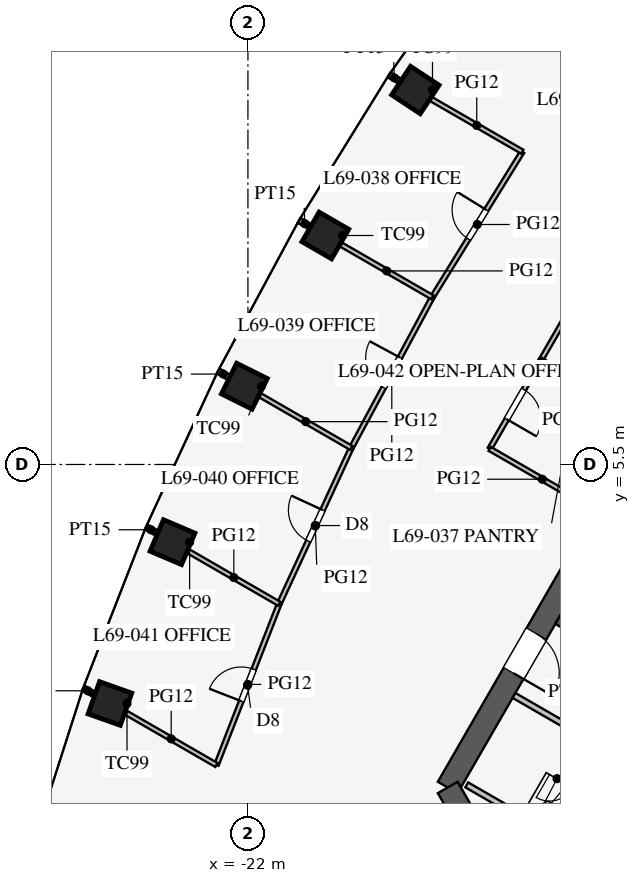
"""IFC4 building model, lengths in metres.
Left out: names, types, materials, properties, quantities, classifications, styles, units other than length and angle.
Written with IfcOpenShell. Run it as: python <this file> out.ifc"""

import sys

from ifc_helpers import new_model, si_unit, direction, frame, frame_2d, origin, origin_2d, place, context, subcontext, project, spatial, rectangle, extrude, element, fill, save


model = new_model("IFC4")
c1 = context("Model", 3, precision=1e-05, world=origin(), true_north=direction((0.0, 1.0)))
c2 = subcontext(c1, "Body", "Model", "MODEL_VIEW")
j1 = project(units=[si_unit("LENGTHUNIT", "METRE"), si_unit("PLANEANGLEUNIT", "RADIAN")], contexts=[c1])
p1 = place(None, origin())
s1 = spatial("IfcSite", under=j1, at=p1, CompositionType="ELEMENT")
p2 = place(p1, origin())
s2 = spatial("IfcBuilding", under=s1, at=p2, CompositionType="ELEMENT")
p3 = place(p2, frame((0.0, 0.0, 301.5)))
s3 = spatial("IfcBuildingStorey", under=s2, at=p3, CompositionType="ELEMENT", Elevation=301.5)
for number, where, z_axis, x_axis in (
    (1, (-17.594, 15.354, 0.0), (0.0, 0.0, 1.0), (-0.552, -0.834, 0.0)),
    (2, (-19.963, 11.526, 0.0), (0.0, 0.0, 1.0), (-0.5, -0.866, 0.0)),
    (3, (-22.094, 7.56, 0.0), (0.0, 0.0, 1.0), (-0.447, -0.895, 0.0)),
    (4, (-23.985, 3.455, 0.0), (0.0, 0.0, 1.0), (-0.391, -0.92, 0.0)),
    (5, (-25.632, -0.79, 0.0), (0.0, 0.0, 1.0), (-0.334, -0.942, 0.0)),
):
    element("IfcColumn", number, at=place(p3, frame(where, z_axis=z_axis, x_axis=x_axis)), inside=s3, PredefinedType="COLUMN", context=c2, shape_type="SweptSolid", body=[
        extrude(rectangle(XDim=0.9, YDim=0.9, at=origin_2d()), origin(), (0.0, 0.0, 1.0), 4.2),
    ])
p4 = place(p3, frame((-5.773, 16.0, 0.0), z_axis=(0.0, 0.0, 1.0), x_axis=(-0.500002442456, -0.866023993627, 0.0)))
e6 = element("IfcWall", 6, at=p4, inside=s3, PredefinedType="SHEAR", context=c2, shape_type="SweptSolid", body=[
    extrude(rectangle(XDim=21.939, YDim=0.6, at=frame_2d((10.97, 0.0))), origin(), (0.0, 0.0, 1.0), 4.2),
])
p5 = place(p4, frame((17.27, 0.0, 0.0)))
e7 = element("IfcOpeningElement", 7, at=p5, cuts=e6, PredefinedType="OPENING", context=c2, shape_type="SweptSolid", body=[
    extrude(rectangle(XDim=1.2, YDim=2.1, at=frame_2d((0.6, 1.05))), frame((0.0, 0.31, 0.0), z_axis=(0.0, -1.0, 0.0), x_axis=(1.0, 0.0, 0.0)), (0.0, 0.0, 1.0), 0.62),
])
p6 = place(p4, frame((3.47, 0.0, 0.0)))
e8 = element("IfcOpeningElement", 8, at=p6, cuts=e6, PredefinedType="OPENING", context=c2, shape_type="SweptSolid", body=[
    extrude(rectangle(XDim=1.2, YDim=2.1, at=frame_2d((0.6, 1.05))), frame((0.0, 0.31, 0.0), z_axis=(0.0, -1.0, 0.0), x_axis=(1.0, 0.0, 0.0)), (0.0, 0.0, 1.0), 0.62),
])
p7 = place(p3, frame((-16.743, -3.0, 0.0), z_axis=(0.0, 0.0, 1.0), x_axis=(0.499995765644, -0.866027848477, 0.0)))
e9 = element("IfcWall", 9, at=p7, inside=s3, PredefinedType="SHEAR", context=c2, shape_type="SweptSolid", body=[
    extrude(rectangle(XDim=11.547, YDim=0.6, at=frame_2d((5.773, 0.0))), origin(), (0.0, 0.0, 1.0), 4.2),
])
p8 = place(p3, frame((-11.532, 0.076, 0.0), z_axis=(0.0, 0.0, 1.0), x_axis=(-0.86604424267, 0.499967368674, 0.0)))
e10 = element("IfcWall", 10, at=p8, inside=s3, PredefinedType="SHEAR", context=c2, shape_type="SweptSolid", body=[
    extrude(rectangle(XDim=2.675, YDim=0.25, at=frame_2d((1.337, 0.0))), origin(), (0.0, 0.0, 1.0), 4.2),
])
p9 = place(p3, frame((-6.663, -1.509, 0.0), z_axis=(0.0, 0.0, 1.0), x_axis=(-0.86603049496, -0.499991181721, 0.0)))
e11 = element("IfcWall", 11, at=p9, inside=s3, PredefinedType="SHEAR", context=c2, shape_type="SweptSolid", body=[
    extrude(rectangle(XDim=9.175, YDim=0.6, at=frame_2d((4.587, 0.0))), origin(), (0.0, 0.0, 1.0), 4.2),
])
p10 = place(p3, frame((-10.495, -3.178, 0.0), z_axis=(0.0, 0.0, 1.0), x_axis=(-0.866021400173, 0.500006934395, 0.0)))
e12 = element("IfcWall", 12, at=p10, inside=s3, PredefinedType="PARTITIONING", context=c2, shape_type="SweptSolid", body=[
    extrude(rectangle(XDim=5.2, YDim=0.15, at=frame_2d((2.6, 0.0))), origin(), (0.0, 0.0, 1.0), 4.0),
])
p11 = place(p10, frame((1.3, 0.0, 0.0)))
e13 = element("IfcOpeningElement", 13, at=p11, cuts=e12, PredefinedType="OPENING", context=c2, shape_type="SweptSolid", body=[
    extrude(rectangle(XDim=0.9, YDim=2.1, at=frame_2d((0.45, 1.05))), frame((0.0, 0.085, 0.0), z_axis=(0.0, -1.0, 0.0), x_axis=(1.0, 0.0, 0.0)), (0.0, 0.0, 1.0), 0.17),
])
p12 = place(p3, frame((-12.691, -4.982, 0.0), z_axis=(0.0, 0.0, 1.0), x_axis=(-0.8660249478, 0.500000789788, 0.0)))
e14 = element("IfcWall", 14, at=p12, inside=s3, PredefinedType="PARTITIONING", context=c2, shape_type="SweptSolid", body=[
    extrude(rectangle(XDim=4.1, YDim=0.15, at=frame_2d((2.05, 0.0))), origin(), (0.0, 0.0, 1.0), 4.0),
])
p13 = place(p3, frame((-14.289, 8.25, 0.0), z_axis=(0.0, 0.0, 1.0), x_axis=(-0.50000943426, -0.866019956843, 0.0)))
e15 = element("IfcWall", 15, at=p13, inside=s3, PredefinedType="PARTITIONING", context=c2, shape_type="SweptSolid", body=[
    extrude(rectangle(XDim=2.7, YDim=0.12, at=frame_2d((1.35, 0.0))), origin(), (0.0, 0.0, 1.0), 2.9),
])
p14 = place(p13, frame((0.9, 0.0, 0.15)))
e16 = element("IfcOpeningElement", 16, at=p14, cuts=e15, PredefinedType="OPENING", context=c2, shape_type="SweptSolid", body=[
    extrude(rectangle(XDim=0.9, YDim=2.1, at=frame_2d((0.45, 1.05))), frame((0.0, 0.07, 0.0), z_axis=(0.0, -1.0, 0.0), x_axis=(1.0, 0.0, 0.0)), (0.0, 0.0, 1.0), 0.14),
])
p15 = place(p3, frame((-11.49, 13.1, 0.0), z_axis=(0.0, 0.0, 1.0), x_axis=(-0.499965239061, -0.866045472092, 0.0)))
e17 = element("IfcWall", 17, at=p15, inside=s3, PredefinedType="PARTITIONING", context=c2, shape_type="SweptSolid", body=[
    extrude(rectangle(XDim=5.6, YDim=0.12, at=frame_2d((2.8, 0.0))), origin(), (0.0, 0.0, 1.0), 2.9),
])
p16 = place(p15, frame((2.3, 0.0, 0.15)))
e18 = element("IfcOpeningElement", 18, at=p16, cuts=e17, PredefinedType="OPENING", context=c2, shape_type="SweptSolid", body=[
    extrude(rectangle(XDim=1.0, YDim=2.1, at=frame_2d((0.5, 1.05))), frame((0.0, 0.07, 0.0), z_axis=(0.0, -1.0, 0.0), x_axis=(1.0, 0.0, 0.0)), (0.0, 0.0, 1.0), 0.14),
])
for number, where, z_axis, x_axis in (
    (19, (-12.868, 4.312, 0.0), (0.0, 0.0, 1.0), (-0.866, 0.5, 0.0)),
    (20, (-11.518, 6.65, 0.0), (0.0, 0.0, 1.0), (-0.866, 0.5, 0.0)),
):
    element("IfcWall", number, at=place(p3, frame(where, z_axis=z_axis, x_axis=x_axis)), inside=s3, PredefinedType="PARTITIONING", context=c2, shape_type="SweptSolid", body=[
        extrude(rectangle(XDim=3.2, YDim=0.12, at=frame_2d((1.6, 0.0))), origin(), (0.0, 0.0, 1.0), 2.9),
    ])
p17 = place(p3, frame((-20.356, 11.753, 0.0), z_axis=(0.0, 0.0, 1.0), x_axis=(-0.865899514186, 0.500217983815, 0.0)))
e21 = element("IfcWall", 21, at=p17, inside=s3, PredefinedType="PARTITIONING", context=c2, shape_type="SweptSolid", body=[
    extrude(rectangle(XDim=0.341, YDim=0.15, at=frame_2d((0.17, 0.0))), origin(), (0.0, 0.0, 1.0), 2.9),
])
p18 = place(p3, frame((-26.089, -0.526, 0.0), z_axis=(0.0, 0.0, 1.0), x_axis=(-0.865982457891, 0.500074377092, 0.0)))
e22 = element("IfcWall", 22, at=p18, inside=s3, PredefinedType="PARTITIONING", context=c2, shape_type="SweptSolid", body=[
    extrude(rectangle(XDim=0.28, YDim=0.15, at=frame_2d((0.14, 0.0))), origin(), (0.0, 0.0, 1.0), 2.9),
])
p19 = place(p3, frame((-22.51, 7.8, 0.0), z_axis=(0.0, 0.0, 1.0), x_axis=(-0.866095534226, 0.499878510834, 0.0)))
e23 = element("IfcWall", 23, at=p19, inside=s3, PredefinedType="PARTITIONING", context=c2, shape_type="SweptSolid", body=[
    extrude(rectangle(XDim=0.316, YDim=0.15, at=frame_2d((0.158, 0.0))), origin(), (0.0, 0.0, 1.0), 2.9),
])
p20 = place(p3, frame((-24.422, 3.708, 0.0), z_axis=(0.0, 0.0, 1.0), x_axis=(-0.866254317358, 0.499603300288, 0.0)))
e24 = element("IfcWall", 24, at=p20, inside=s3, PredefinedType="PARTITIONING", context=c2, shape_type="SweptSolid", body=[
    extrude(rectangle(XDim=0.296, YDim=0.15, at=frame_2d((0.148, 0.0))), origin(), (0.0, 0.0, 1.0), 2.9),
])
p21 = place(p3, frame((-18.01, 15.594, 0.0), z_axis=(0.0, 0.0, 1.0), x_axis=(-0.866095534226, 0.499878510834, 0.0)))
e25 = element("IfcWall", 25, at=p21, inside=s3, PredefinedType="PARTITIONING", context=c2, shape_type="SweptSolid", body=[
    extrude(rectangle(XDim=0.316, YDim=0.15, at=frame_2d((0.158, 0.0))), origin(), (0.0, 0.0, 1.0), 2.9),
])
p22 = place(p3, frame((-17.149, 9.901, 0.0), z_axis=(0.0, 0.0, 1.0), x_axis=(-0.473566170147, -0.880758242932, 0.0)))
e26 = element("IfcWall", 26, at=p22, inside=s3, PredefinedType="PARTITIONING", context=c2, shape_type="SweptSolid", body=[
    extrude(rectangle(XDim=4.502, YDim=0.12, at=frame_2d((2.251, 0.0))), origin(), (0.0, 0.0, 1.0), 2.9),
])
p23 = place(p22, frame((1.8, 0.0, 0.15)))
e27 = element("IfcOpeningElement", 27, at=p23, cuts=e26, PredefinedType="OPENING", context=c2, shape_type="SweptSolid", body=[
    extrude(rectangle(XDim=0.9, YDim=2.1, at=frame_2d((0.45, 1.05))), frame((0.0, 0.07, 0.0), z_axis=(0.0, -1.0, 0.0), x_axis=(1.0, 0.0, 0.0)), (0.0, 0.0, 1.0), 0.14),
])
p24 = place(p3, frame((-19.281, 5.936, 0.0), z_axis=(0.0, 0.0, 1.0), x_axis=(-0.419270595022, -0.907861315483, 0.0)))
e28 = element("IfcWall", 28, at=p24, inside=s3, PredefinedType="PARTITIONING", context=c2, shape_type="SweptSolid", body=[
    extrude(rectangle(XDim=4.519, YDim=0.12, at=frame_2d((2.259, 0.0))), origin(), (0.0, 0.0, 1.0), 2.9),
])
p25 = place(p24, frame((1.8, 0.0, 0.15)))
e29 = element("IfcOpeningElement", 29, at=p25, cuts=e28, PredefinedType="OPENING", context=c2, shape_type="SweptSolid", body=[
    extrude(rectangle(XDim=0.9, YDim=2.1, at=frame_2d((0.45, 1.05))), frame((0.0, 0.07, 0.0), z_axis=(0.0, -1.0, 0.0), x_axis=(1.0, 0.0, 0.0)), (0.0, 0.0, 1.0), 0.14),
])
p26 = place(p3, frame((-21.175, 1.833, 0.0), z_axis=(0.0, 0.0, 1.0), x_axis=(-0.363230297573, -0.931699388711, 0.0)))
e30 = element("IfcWall", 30, at=p26, inside=s3, PredefinedType="PARTITIONING", context=c2, shape_type="SweptSolid", body=[
    extrude(rectangle(XDim=4.552, YDim=0.12, at=frame_2d((2.276, 0.0))), origin(), (0.0, 0.0, 1.0), 2.9),
])
p27 = place(p26, frame((1.85, 0.0, 0.15)))
e31 = element("IfcOpeningElement", 31, at=p27, cuts=e30, PredefinedType="OPENING", context=c2, shape_type="SweptSolid", body=[
    extrude(rectangle(XDim=0.9, YDim=2.1, at=frame_2d((0.45, 1.05))), frame((0.0, 0.07, 0.0), z_axis=(0.0, -1.0, 0.0), x_axis=(1.0, 0.0, 0.0)), (0.0, 0.0, 1.0), 0.14),
])
p28 = place(p3, frame((-14.781, 13.73, 0.0), z_axis=(0.0, 0.0, 1.0), x_axis=(-0.525981173851, -0.850496210899, 0.0)))
e32 = element("IfcWall", 32, at=p28, inside=s3, PredefinedType="PARTITIONING", context=c2, shape_type="SweptSolid", body=[
    extrude(rectangle(XDim=4.502, YDim=0.12, at=frame_2d((2.251, 0.0))), origin(), (0.0, 0.0, 1.0), 2.9),
])
p29 = place(p28, frame((1.8, 0.0, 0.15)))
e33 = element("IfcOpeningElement", 33, at=p29, cuts=e32, PredefinedType="OPENING", context=c2, shape_type="SweptSolid", body=[
    extrude(rectangle(XDim=0.9, YDim=2.1, at=frame_2d((0.45, 1.05))), frame((0.0, 0.07, 0.0), z_axis=(0.0, -1.0, 0.0), x_axis=(1.0, 0.0, 0.0)), (0.0, 0.0, 1.0), 0.14),
])
p30 = place(p3, frame((-17.149, 9.901, 0.0), z_axis=(0.0, 0.0, 1.0), x_axis=(-0.866027073272, 0.499997108352, 0.0)))
e34 = element("IfcWall", 34, at=p30, inside=s3, PredefinedType="PARTITIONING", context=c2, shape_type="SweptSolid", body=[
    extrude(rectangle(XDim=2.77, YDim=0.12, at=frame_2d((1.385, 0.0))), origin(), (0.0, 0.0, 1.0), 2.9),
])
p31 = place(p3, frame((-22.829, -2.408, 0.0), z_axis=(0.0, 0.0, 1.0), x_axis=(-0.866031754707, 0.499988999718, 0.0)))
e35 = element("IfcWall", 35, at=p31, inside=s3, PredefinedType="PARTITIONING", context=c2, shape_type="SweptSolid", body=[
    extrude(rectangle(XDim=2.749, YDim=0.12, at=frame_2d((1.374, 0.0))), origin(), (0.0, 0.0, 1.0), 2.9),
])
p32 = place(p3, frame((-19.281, 5.936, 0.0), z_axis=(0.0, 0.0, 1.0), x_axis=(-0.866019581949, 0.500010083578, 0.0)))
e36 = element("IfcWall", 36, at=p32, inside=s3, PredefinedType="PARTITIONING", context=c2, shape_type="SweptSolid", body=[
    extrude(rectangle(XDim=2.768, YDim=0.12, at=frame_2d((1.384, 0.0))), origin(), (0.0, 0.0, 1.0), 2.9),
])
p33 = place(p3, frame((-21.175, 1.833, 0.0), z_axis=(0.0, 0.0, 1.0), x_axis=(-0.86602506628, 0.500000584575, 0.0)))
e37 = element("IfcWall", 37, at=p33, inside=s3, PredefinedType="PARTITIONING", context=c2, shape_type="SweptSolid", body=[
    extrude(rectangle(XDim=2.761, YDim=0.12, at=frame_2d((1.38, 0.0))), origin(), (0.0, 0.0, 1.0), 2.9),
])
p34 = place(p3, frame((-14.781, 13.73, 0.0), z_axis=(0.0, 0.0, 1.0), x_axis=(-0.866019581949, 0.500010083578, 0.0)))
e38 = element("IfcWall", 38, at=p34, inside=s3, PredefinedType="PARTITIONING", context=c2, shape_type="SweptSolid", body=[
    extrude(rectangle(XDim=2.768, YDim=0.12, at=frame_2d((1.384, 0.0))), origin(), (0.0, 0.0, 1.0), 2.9),
])
p35 = place(p5, origin())
e39 = element("IfcDoor", 39, at=p35, inside=s3, OperationType="SINGLE_SWING_RIGHT", PredefinedType="DOOR", context=c2, shape_type="SweptSolid", body=[
    extrude(rectangle(XDim=1.2, YDim=2.1, at=frame_2d((0.6, 1.05))), frame((0.0, 0.025, 0.0), z_axis=(0.0, -1.0, 0.0), x_axis=(1.0, 0.0, 0.0)), (0.0, 0.0, 1.0), 0.05),
])
fill(e7, e39)
p36 = place(p14, origin())
e40 = element("IfcDoor", 40, at=p36, inside=s3, OperationType="SINGLE_SWING_RIGHT", PredefinedType="DOOR", context=c2, shape_type="SweptSolid", body=[
    extrude(rectangle(XDim=0.9, YDim=2.1, at=frame_2d((0.45, 1.05))), frame((0.0, 0.025, 0.0), z_axis=(0.0, -1.0, 0.0), x_axis=(1.0, 0.0, 0.0)), (0.0, 0.0, 1.0), 0.05),
])
fill(e16, e40)
p37 = place(p29, frame((0.9, 0.0, 0.0), z_axis=(0.0, 0.0, 1.0), x_axis=(-1.0, 0.0, 0.0)))
e41 = element("IfcDoor", 41, at=p37, inside=s3, OperationType="SINGLE_SWING_RIGHT", PredefinedType="DOOR", context=c2, shape_type="SweptSolid", body=[
    extrude(rectangle(XDim=0.9, YDim=2.1, at=frame_2d((0.45, 1.05))), frame((0.0, 0.025, 0.0), z_axis=(0.0, -1.0, 0.0), x_axis=(1.0, 0.0, 0.0)), (0.0, 0.0, 1.0), 0.05),
])
fill(e33, e41)
p38 = place(p23, frame((0.9, 0.0, 0.0), z_axis=(0.0, 0.0, 1.0), x_axis=(-1.0, 0.0, 0.0)))
e42 = element("IfcDoor", 42, at=p38, inside=s3, OperationType="SINGLE_SWING_RIGHT", PredefinedType="DOOR", context=c2, shape_type="SweptSolid", body=[
    extrude(rectangle(XDim=0.9, YDim=2.1, at=frame_2d((0.45, 1.05))), frame((0.0, 0.025, 0.0), z_axis=(0.0, -1.0, 0.0), x_axis=(1.0, 0.0, 0.0)), (0.0, 0.0, 1.0), 0.05),
])
fill(e27, e42)
p39 = place(p25, frame((0.9, 0.0, 0.0), z_axis=(0.0, 0.0, 1.0), x_axis=(-1.0, 0.0, 0.0)))
e43 = element("IfcDoor", 43, at=p39, inside=s3, OperationType="SINGLE_SWING_RIGHT", PredefinedType="DOOR", context=c2, shape_type="SweptSolid", body=[
    extrude(rectangle(XDim=0.9, YDim=2.1, at=frame_2d((0.45, 1.05))), frame((0.0, 0.025, 0.0), z_axis=(0.0, -1.0, 0.0), x_axis=(1.0, 0.0, 0.0)), (0.0, 0.0, 1.0), 0.05),
])
fill(e29, e43)
p40 = place(p27, frame((0.9, 0.0, 0.0), z_axis=(0.0, 0.0, 1.0), x_axis=(-1.0, 0.0, 0.0)))
e44 = element("IfcDoor", 44, at=p40, inside=s3, OperationType="SINGLE_SWING_LEFT", PredefinedType="DOOR", context=c2, shape_type="SweptSolid", body=[
    extrude(rectangle(XDim=0.9, YDim=2.1, at=frame_2d((0.45, 1.05))), frame((0.0, 0.025, 0.0), z_axis=(0.0, -1.0, 0.0), x_axis=(1.0, 0.0, 0.0)), (0.0, 0.0, 1.0), 0.05),
])
fill(e31, e44)
save(model, sys.argv[1])
